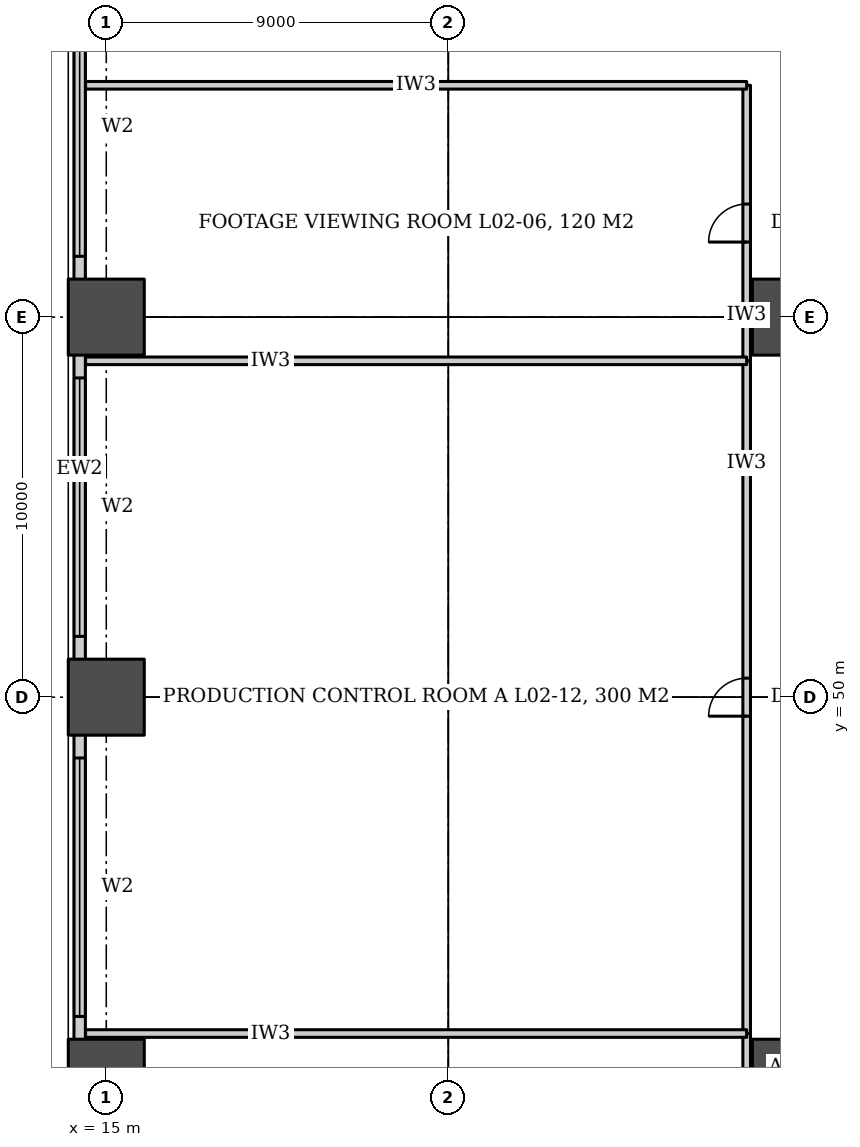
"""IFC4 building model, lengths in metres.
Left out: names, types, materials, properties, quantities, classifications, styles, units other than length and angle.
Written with IfcOpenShell. Run it as: python <this file> out.ifc"""

import sys

from ifc_helpers import new_model, si_unit, direction, frame, frame_2d, origin, origin_2d, place, context, subcontext, project, spatial, rectangle, extrude, element, fill, save


model = new_model("IFC4")
c1 = context("Model", 3, precision=1e-05, world=origin(), true_north=direction((0.0, 1.0)))
c2 = subcontext(c1, "Body", "Model", "MODEL_VIEW")
j1 = project(units=[si_unit("LENGTHUNIT", "METRE"), si_unit("PLANEANGLEUNIT", "RADIAN")], contexts=[c1])
p1 = place(None, origin())
s1 = spatial("IfcSite", under=j1, at=p1, CompositionType="ELEMENT")
p2 = place(p1, origin())
s2 = spatial("IfcBuilding", under=s1, at=p2, CompositionType="ELEMENT")
p3 = place(p2, frame((0.0, 0.0, 15.0)))
s3 = spatial("IfcBuildingStorey", under=s2, at=p3, CompositionType="ELEMENT", Elevation=15.0)
for number, where, z_axis, x_axis in (
    (1, (15.0, 40.0, 0.0), (0.0, 0.0, 1.0), (1.0, 0.0, 0.0)),
    (2, (33.0, 40.0, 0.0), (0.0, 0.0, 1.0), (1.0, 0.0, 0.0)),
    (3, (15.0, 50.0, 0.0), (0.0, 0.0, 1.0), (1.0, 0.0, 0.0)),
    (4, (15.0, 60.0, 0.0), (0.0, 0.0, 1.0), (1.0, 0.0, 0.0)),
    (5, (33.0, 60.0, 0.0), (0.0, 0.0, 1.0), (1.0, 0.0, 0.0)),
):
    element("IfcColumn", number, at=place(p3, frame(where, z_axis=z_axis, x_axis=x_axis)), inside=s3, PredefinedType="COLUMN", context=c2, shape_type="SweptSolid", body=[
        extrude(rectangle(XDim=2.0, YDim=2.0, at=origin_2d()), origin(), (0.0, 0.0, 1.0), 5.0),
    ])
p4 = place(p3, frame((31.85, 33.4, 0.0), z_axis=(0.0, 0.0, 1.0), x_axis=(0.0, 1.0, 0.0)))
e6 = element("IfcWall", 6, at=p4, inside=s3, PredefinedType="PARTITIONING", context=c2, shape_type="SweptSolid", body=[
    extrude(rectangle(XDim=7.75, YDim=0.2, at=frame_2d((3.875, 0.0))), origin(), (0.0, 0.0, 1.0), 2.18),
])
p5 = place(p4, frame((3.375, 0.0, 0.0)))
e7 = element("IfcOpeningElement", 7, at=p5, cuts=e6, PredefinedType="OPENING", context=c2, shape_type="SweptSolid", body=[
    extrude(rectangle(XDim=1.0, YDim=2.1, at=frame_2d((0.5, 1.05))), frame((0.0, 0.11, 0.0), z_axis=(0.0, -1.0, 0.0), x_axis=(1.0, 0.0, 0.0)), (0.0, 0.0, 1.0), 0.22),
])
p6 = place(p3, frame((31.85, 41.15, 0.0), z_axis=(0.0, 0.0, 1.0), x_axis=(0.0, 1.0, 0.0)))
e8 = element("IfcWall", 8, at=p6, inside=s3, PredefinedType="PARTITIONING", context=c2, shape_type="SweptSolid", body=[
    extrude(rectangle(XDim=17.7, YDim=0.2, at=frame_2d((8.85, 0.0))), origin(), (0.0, 0.0, 1.0), 2.18),
])
p7 = place(p6, frame((8.35, 0.0, 0.0)))
e9 = element("IfcOpeningElement", 9, at=p7, cuts=e8, PredefinedType="OPENING", context=c2, shape_type="SweptSolid", body=[
    extrude(rectangle(XDim=1.0, YDim=2.1, at=frame_2d((0.5, 1.05))), frame((0.0, 0.11, 0.0), z_axis=(0.0, -1.0, 0.0), x_axis=(1.0, 0.0, 0.0)), (0.0, 0.0, 1.0), 0.22),
])
p8 = place(p3, frame((31.85, 58.85, 0.0), z_axis=(0.0, 0.0, 1.0), x_axis=(0.0, 1.0, 0.0)))
e10 = element("IfcWall", 10, at=p8, inside=s3, PredefinedType="PARTITIONING", context=c2, shape_type="SweptSolid", body=[
    extrude(rectangle(XDim=7.25, YDim=0.2, at=frame_2d((3.625, 0.0))), origin(), (0.0, 0.0, 1.0), 2.18),
])
p9 = place(p8, frame((3.125, 0.0, 0.0)))
e11 = element("IfcOpeningElement", 11, at=p9, cuts=e10, PredefinedType="OPENING", context=c2, shape_type="SweptSolid", body=[
    extrude(rectangle(XDim=1.0, YDim=2.1, at=frame_2d((0.5, 1.05))), frame((0.0, 0.11, 0.0), z_axis=(0.0, -1.0, 0.0), x_axis=(1.0, 0.0, 0.0)), (0.0, 0.0, 1.0), 0.22),
])
for number, where, z_axis, x_axis in (
    (12, (14.455, 41.15, 0.0), (0.0, 0.0, 1.0), (1.0, 0.0, 0.0)),
    (13, (14.455, 58.85, 0.0), (0.0, 0.0, 1.0), (1.0, 0.0, 0.0)),
    (14, (14.455, 66.1, 0.0), (0.0, 0.0, 1.0), (1.0, 0.0, 0.0)),
):
    element("IfcWall", number, at=place(p3, frame(where, z_axis=z_axis, x_axis=x_axis)), inside=s3, PredefinedType="PARTITIONING", context=c2, shape_type="SweptSolid", body=[
        extrude(rectangle(XDim=17.395, YDim=0.2, at=frame_2d((8.698, 0.0))), origin(), (0.0, 0.0, 1.0), 2.68),
    ])
p10 = place(p3, frame((14.3, 70.0, 0.0), z_axis=(0.0, 0.0, 1.0), x_axis=(0.0, -1.0, 0.0)))
e15 = element("IfcWall", 15, at=p10, inside=s3, PredefinedType="SOLIDWALL", context=c2, shape_type="SweptSolid", body=[
    extrude(rectangle(XDim=40.0, YDim=0.3, at=frame_2d((20.0, 0.0))), origin(), (0.0, 0.0, 1.0), 4.7),
])
p11 = place(p10, frame((31.6, 0.0, 1.2)))
e16 = element("IfcOpeningElement", 16, at=p11, cuts=e15, PredefinedType="OPENING", context=c2, shape_type="SweptSolid", body=[
    extrude(rectangle(XDim=6.8, YDim=1.5, at=frame_2d((3.4, 0.75))), frame((0.0, 0.16, 0.0), z_axis=(0.0, -1.0, 0.0), x_axis=(1.0, 0.0, 0.0)), (0.0, 0.0, 1.0), 0.32),
])
p12 = place(p10, frame((21.6, 0.0, 1.2)))
e17 = element("IfcOpeningElement", 17, at=p12, cuts=e15, PredefinedType="OPENING", context=c2, shape_type="SweptSolid", body=[
    extrude(rectangle(XDim=6.8, YDim=1.5, at=frame_2d((3.4, 0.75))), frame((0.0, 0.16, 0.0), z_axis=(0.0, -1.0, 0.0), x_axis=(1.0, 0.0, 0.0)), (0.0, 0.0, 1.0), 0.32),
])
p13 = place(p10, frame((11.6, 0.0, 1.2)))
e18 = element("IfcOpeningElement", 18, at=p13, cuts=e15, PredefinedType="OPENING", context=c2, shape_type="SweptSolid", body=[
    extrude(rectangle(XDim=6.8, YDim=1.5, at=frame_2d((3.4, 0.75))), frame((0.0, 0.16, 0.0), z_axis=(0.0, -1.0, 0.0), x_axis=(1.0, 0.0, 0.0)), (0.0, 0.0, 1.0), 0.32),
])
p14 = place(p10, frame((1.6, 0.0, 1.2)))
e19 = element("IfcOpeningElement", 19, at=p14, cuts=e15, PredefinedType="OPENING", context=c2, shape_type="SweptSolid", body=[
    extrude(rectangle(XDim=6.8, YDim=1.5, at=frame_2d((3.4, 0.75))), frame((0.0, 0.16, 0.0), z_axis=(0.0, -1.0, 0.0), x_axis=(1.0, 0.0, 0.0)), (0.0, 0.0, 1.0), 0.32),
])
p15 = place(p7, origin())
e20 = element("IfcDoor", 20, at=p15, inside=s3, OperationType="SINGLE_SWING_LEFT", PredefinedType="DOOR", context=c2, shape_type="SweptSolid", body=[
    extrude(rectangle(XDim=1.0, YDim=2.1, at=frame_2d((0.5, 1.05))), frame((0.0, 0.025, 0.0), z_axis=(0.0, -1.0, 0.0), x_axis=(1.0, 0.0, 0.0)), (0.0, 0.0, 1.0), 0.05),
])
fill(e9, e20)
p16 = place(p9, origin())
e21 = element("IfcDoor", 21, at=p16, inside=s3, OperationType="SINGLE_SWING_LEFT", PredefinedType="DOOR", context=c2, shape_type="SweptSolid", body=[
    extrude(rectangle(XDim=1.0, YDim=2.1, at=frame_2d((0.5, 1.05))), frame((0.0, 0.025, 0.0), z_axis=(0.0, -1.0, 0.0), x_axis=(1.0, 0.0, 0.0)), (0.0, 0.0, 1.0), 0.05),
])
fill(e11, e21)
p17 = place(p12, origin())
e22 = element("IfcWindow", 22, at=p17, inside=s3, PartitioningType="SINGLE_PANEL", PredefinedType="WINDOW", context=c2, shape_type="SweptSolid", body=[
    extrude(rectangle(XDim=6.8, YDim=1.5, at=frame_2d((3.4, 0.75))), frame((0.0, 0.03, 0.0), z_axis=(0.0, -1.0, 0.0), x_axis=(1.0, 0.0, 0.0)), (0.0, 0.0, 1.0), 0.06),
])
fill(e17, e22)
p18 = place(p13, origin())
e23 = element("IfcWindow", 23, at=p18, inside=s3, PartitioningType="SINGLE_PANEL", PredefinedType="WINDOW", context=c2, shape_type="SweptSolid", body=[
    extrude(rectangle(XDim=6.8, YDim=1.5, at=frame_2d((3.4, 0.75))), frame((0.0, 0.03, 0.0), z_axis=(0.0, -1.0, 0.0), x_axis=(1.0, 0.0, 0.0)), (0.0, 0.0, 1.0), 0.06),
])
fill(e18, e23)
p19 = place(p14, origin())
e24 = element("IfcWindow", 24, at=p19, inside=s3, PartitioningType="SINGLE_PANEL", PredefinedType="WINDOW", context=c2, shape_type="SweptSolid", body=[
    extrude(rectangle(XDim=6.8, YDim=1.5, at=frame_2d((3.4, 0.75))), frame((0.0, 0.03, 0.0), z_axis=(0.0, -1.0, 0.0), x_axis=(1.0, 0.0, 0.0)), (0.0, 0.0, 1.0), 0.06),
])
fill(e19, e24)
save(model, sys.argv[1])
